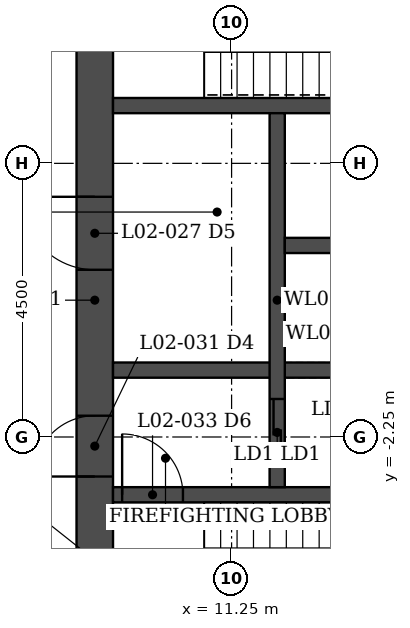
"""IFC4 building model, lengths in metres.
Left out: names, types, materials, properties, quantities, classifications, styles, units other than length and angle.
Written with IfcOpenShell. Run it as: python <this file> out.ifc"""

import sys

from ifc_helpers import new_model, si_unit, direction, frame, frame_2d, origin, place, context, subcontext, project, spatial, rectangle, extrude, element, fill, save


model = new_model("IFC4")
c1 = context("Model", 3, precision=1e-05, world=origin(), true_north=direction((0.0, 1.0)))
c2 = subcontext(c1, "Body", "Model", "MODEL_VIEW")
j1 = project(units=[si_unit("LENGTHUNIT", "METRE"), si_unit("PLANEANGLEUNIT", "RADIAN")], contexts=[c1])
p1 = place(None, origin())
s1 = spatial("IfcSite", under=j1, at=p1, CompositionType="ELEMENT")
p2 = place(p1, origin())
s2 = spatial("IfcBuilding", under=s1, at=p2, CompositionType="ELEMENT")
p3 = place(p2, frame((0.0, 0.0, 11.0)))
s3 = spatial("IfcBuildingStorey", under=s2, at=p3, CompositionType="ELEMENT", Elevation=11.0)
p4 = place(p3, frame((9.0, -6.45, 0.0), z_axis=(0.0, 0.0, 1.0), x_axis=(0.0, 1.0, 0.0)))
e1 = element("IfcWall", 1, at=p4, inside=s3, PredefinedType="SHEAR", context=c2, shape_type="SweptSolid", body=[
    extrude(rectangle(XDim=12.9, YDim=0.6, at=frame_2d((6.45, 0.0))), origin(), (0.0, 0.0, 1.0), 5.0),
])
p5 = place(p4, frame((3.55, 0.0, 0.0)))
e2 = element("IfcOpeningElement", 2, at=p5, cuts=e1, PredefinedType="OPENING", context=c2, shape_type="SweptSolid", body=[
    extrude(rectangle(XDim=1.0, YDim=2.1, at=frame_2d((0.5, 1.05))), frame((0.0, 0.31, 0.0), z_axis=(0.0, -1.0, 0.0), x_axis=(1.0, 0.0, 0.0)), (0.0, 0.0, 1.0), 0.62),
])
p6 = place(p4, frame((6.95, 0.0, 0.0)))
e3 = element("IfcOpeningElement", 3, at=p6, cuts=e1, PredefinedType="OPENING", context=c2, shape_type="SweptSolid", body=[
    extrude(rectangle(XDim=1.2, YDim=2.1, at=frame_2d((0.6, 1.05))), frame((0.0, 0.31, 0.0), z_axis=(0.0, -1.0, 0.0), x_axis=(1.0, 0.0, 0.0)), (0.0, 0.0, 1.0), 0.62),
])
p7 = place(p4, frame((10.85, 0.0, 0.0)))
e4 = element("IfcOpeningElement", 4, at=p7, cuts=e1, PredefinedType="OPENING", context=c2, shape_type="SweptSolid", body=[
    extrude(rectangle(XDim=1.0, YDim=2.1, at=frame_2d((0.5, 1.05))), frame((0.0, 0.31, 0.0), z_axis=(0.0, -1.0, 0.0), x_axis=(1.0, 0.0, 0.0)), (0.0, 0.0, 1.0), 0.62),
])
p8 = place(p3, frame((9.3, -3.2, 0.0), z_axis=(0.0, 0.0, 1.0), x_axis=(1.0, 0.0, 0.0)))
e5 = element("IfcWall", 5, at=p8, inside=s3, PredefinedType="SHEAR", context=c2, shape_type="SweptSolid", body=[
    extrude(rectangle(XDim=8.4, YDim=0.25, at=frame_2d((4.2, 0.0))), origin(), (0.0, 0.0, 1.0), 5.0),
])
p9 = place(p8, frame((0.15, 0.0, 0.0)))
e6 = element("IfcOpeningElement", 6, at=p9, cuts=e5, PredefinedType="OPENING", context=c2, shape_type="SweptSolid", body=[
    extrude(rectangle(XDim=1.0, YDim=2.1, at=frame_2d((0.5, 1.05))), frame((0.0, 0.135, 0.0), z_axis=(0.0, -1.0, 0.0), x_axis=(1.0, 0.0, 0.0)), (0.0, 0.0, 1.0), 0.27),
])
p10 = place(p3, frame((9.3, 3.2, 0.0), z_axis=(0.0, 0.0, 1.0), x_axis=(1.0, 0.0, 0.0)))
e7 = element("IfcWall", 7, at=p10, inside=s3, PredefinedType="SHEAR", context=c2, shape_type="SweptSolid", body=[
    extrude(rectangle(XDim=8.4, YDim=0.25, at=frame_2d((4.2, 0.0))), origin(), (0.0, 0.0, 1.0), 5.0),
])
p11 = place(p3, frame((9.3, -1.15, 0.0), z_axis=(0.0, 0.0, 1.0), x_axis=(1.0, 0.0, 0.0)))
e8 = element("IfcWall", 8, at=p11, inside=s3, PredefinedType="SHEAR", context=c2, shape_type="SweptSolid", body=[
    extrude(rectangle(XDim=5.375, YDim=0.25, at=frame_2d((2.688, 0.0))), origin(), (0.0, 0.0, 1.0), 5.0),
])
p12 = place(p3, frame((12.0, -3.075, 0.0), z_axis=(0.0, 0.0, 1.0), x_axis=(0.0, 1.0, 0.0)))
e9 = element("IfcWall", 9, at=p12, inside=s3, PredefinedType="SHEAR", context=c2, shape_type="SweptSolid", body=[
    extrude(rectangle(XDim=6.15, YDim=0.25, at=frame_2d((3.075, 0.0))), origin(), (0.0, 0.0, 1.0), 5.0),
])
p13 = place(p12, frame((0.35, 0.0, 0.0)))
e10 = element("IfcOpeningElement", 10, at=p13, cuts=e9, PredefinedType="OPENING", context=c2, shape_type="SweptSolid", body=[
    extrude(rectangle(XDim=1.1, YDim=2.1, at=frame_2d((0.55, 1.05))), frame((0.0, 0.135, 0.0), z_axis=(0.0, -1.0, 0.0), x_axis=(1.0, 0.0, 0.0)), (0.0, 0.0, 1.0), 0.27),
])
p14 = place(p3, frame((12.125, 0.9, 0.0), z_axis=(0.0, 0.0, 1.0), x_axis=(1.0, 0.0, 0.0)))
e11 = element("IfcWall", 11, at=p14, inside=s3, PredefinedType="SHEAR", context=c2, shape_type="SweptSolid", body=[
    extrude(rectangle(XDim=2.55, YDim=0.25, at=frame_2d((1.275, 0.0))), origin(), (0.0, 0.0, 1.0), 5.0),
])
p15 = place(p5, origin())
e12 = element("IfcDoor", 12, at=p15, inside=s3, OperationType="SINGLE_SWING_LEFT", PredefinedType="DOOR", context=c2, shape_type="SweptSolid", body=[
    extrude(rectangle(XDim=1.0, YDim=2.1, at=frame_2d((0.5, 1.05))), frame((0.0, 0.025, 0.0), z_axis=(0.0, -1.0, 0.0), x_axis=(1.0, 0.0, 0.0)), (0.0, 0.0, 1.0), 0.05),
])
fill(e2, e12)
p16 = place(p9, origin())
e13 = element("IfcDoor", 13, at=p16, inside=s3, OperationType="SINGLE_SWING_LEFT", PredefinedType="DOOR", context=c2, shape_type="SweptSolid", body=[
    extrude(rectangle(XDim=1.0, YDim=2.1, at=frame_2d((0.5, 1.05))), frame((0.0, 0.025, 0.0), z_axis=(0.0, -1.0, 0.0), x_axis=(1.0, 0.0, 0.0)), (0.0, 0.0, 1.0), 0.05),
])
fill(e6, e13)
p17 = place(p6, origin())
e14 = element("IfcDoor", 14, at=p17, inside=s3, OperationType="SINGLE_SWING_RIGHT", PredefinedType="DOOR", context=c2, shape_type="SweptSolid", body=[
    extrude(rectangle(XDim=1.2, YDim=2.1, at=frame_2d((0.6, 1.05))), frame((0.0, 0.025, 0.0), z_axis=(0.0, -1.0, 0.0), x_axis=(1.0, 0.0, 0.0)), (0.0, 0.0, 1.0), 0.05),
])
fill(e3, e14)
p18 = place(p13, origin())
e15 = element("IfcDoor", 15, at=p18, inside=s3, OperationType="DOUBLE_DOOR_SLIDING", PredefinedType="DOOR", context=c2, shape_type="SweptSolid", body=[
    extrude(rectangle(XDim=1.1, YDim=2.1, at=frame_2d((0.55, 1.05))), frame((0.0, 0.025, 0.0), z_axis=(0.0, -1.0, 0.0), x_axis=(1.0, 0.0, 0.0)), (0.0, 0.0, 1.0), 0.05),
])
fill(e10, e15)
save(model, sys.argv[1])
